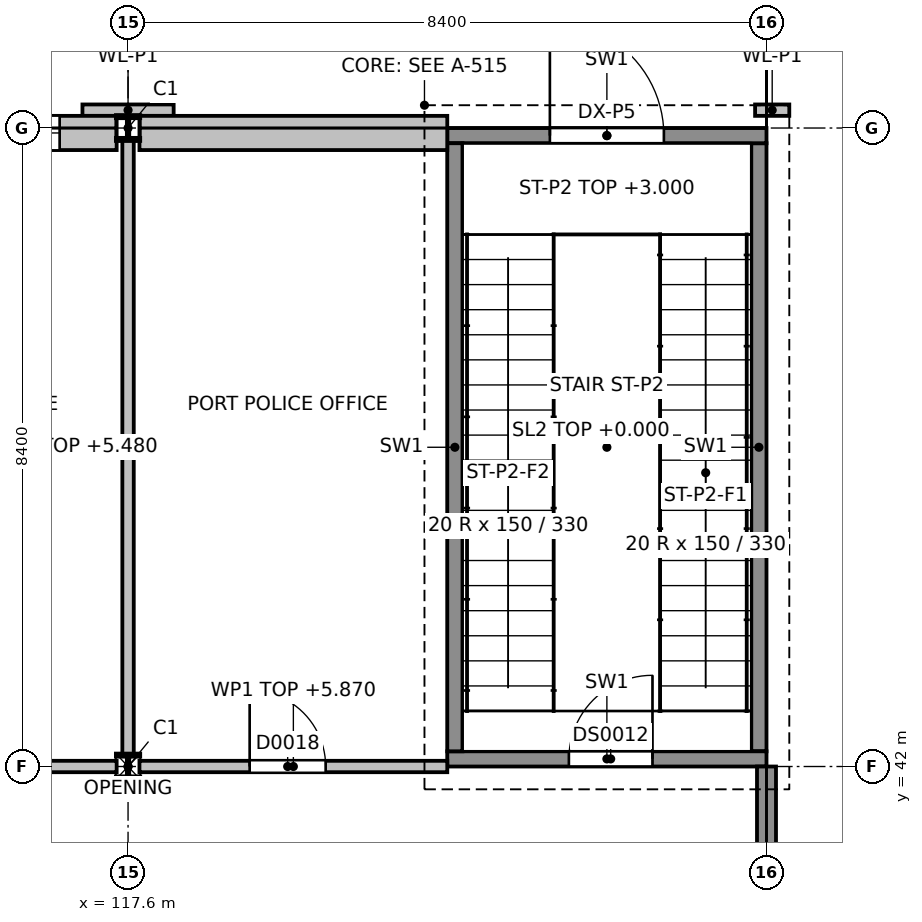
"""IFC4 building model, lengths in metres.
Left out: names, types, materials, properties, quantities, classifications, styles, units other than length and angle.
Written with IfcOpenShell. Run it as: python <this file> out.ifc"""

import sys

from ifc_helpers import new_model, si_unit, direction, frame, frame_2d, origin, origin_2d, place, context, subcontext, project, spatial, rectangle, i_section, extrude, element, fill, save


model = new_model("IFC4")
c1 = context("Model", 3, precision=1e-05, world=origin(), true_north=direction((0.0, 1.0)))
c2 = subcontext(c1, "Body", "Model", "MODEL_VIEW")
j1 = project(units=[si_unit("LENGTHUNIT", "METRE"), si_unit("PLANEANGLEUNIT", "RADIAN")], contexts=[c1])
p1 = place(None, origin())
s1 = spatial("IfcSite", under=j1, at=p1, CompositionType="ELEMENT")
p2 = place(p1, origin())
s2 = spatial("IfcBuilding", under=s1, at=p2, CompositionType="ELEMENT")
p3 = place(p2, origin())
s3 = spatial("IfcBuildingStorey", under=s2, at=p3, CompositionType="ELEMENT", Elevation=0.0)
for number, where, z_axis, x_axis in (
    (1, (117.6, 42.0, -1.35), (0.0, 0.0, 1.0), (1.0, 0.0, 0.0)),
    (2, (117.6, 50.4, -1.35), (0.0, 0.0, 1.0), (1.0, 0.0, 0.0)),
):
    element("IfcColumn", number, at=place(p3, frame(where, z_axis=z_axis, x_axis=x_axis)), inside=s3, PredefinedType="COLUMN", context=c2, shape_type="SweptSolid", body=[
        extrude(i_section(OverallWidth=0.3, OverallDepth=0.32, WebThickness=0.011, FlangeThickness=0.021, at=origin_2d()), origin(), (0.0, 0.0, 1.0), 7.35),
    ])
p4 = place(p3, frame((121.8, 42.1, -1.35), z_axis=(0.0, 0.0, 1.0), x_axis=(1.0, 0.0, 0.0)))
e3 = element("IfcWall", 3, at=p4, inside=s3, PredefinedType="SHEAR", context=c2, shape_type="SweptSolid", body=[
    extrude(rectangle(XDim=4.2, YDim=0.2, at=frame_2d((2.1, 0.0))), origin(), (0.0, 0.0, 1.0), 7.35),
])
p5 = place(p4, frame((1.6, 0.0, 1.35)))
e4 = element("IfcOpeningElement", 4, at=p5, cuts=e3, PredefinedType="OPENING", context=c2, shape_type="SweptSolid", body=[
    extrude(rectangle(XDim=1.1, YDim=2.1, at=frame_2d((0.55, 1.05))), frame((0.0, 0.1, 0.0), z_axis=(0.0, -1.0, 0.0), x_axis=(1.0, 0.0, 0.0)), (0.0, 0.0, 1.0), 0.2),
])
p6 = place(p3, frame((121.8, 50.3, -1.35), z_axis=(0.0, 0.0, 1.0), x_axis=(1.0, 0.0, 0.0)))
e5 = element("IfcWall", 5, at=p6, inside=s3, PredefinedType="SHEAR", context=c2, shape_type="SweptSolid", body=[
    extrude(rectangle(XDim=4.2, YDim=0.2, at=frame_2d((2.1, 0.0))), origin(), (0.0, 0.0, 1.0), 7.35),
])
p7 = place(p6, frame((1.35, 0.0, 1.35)))
e6 = element("IfcOpeningElement", 6, at=p7, cuts=e5, PredefinedType="OPENING", context=c2, shape_type="SweptSolid", body=[
    extrude(rectangle(XDim=1.5, YDim=2.4, at=frame_2d((0.75, 1.2))), frame((0.0, 0.1, 0.0), z_axis=(0.0, -1.0, 0.0), x_axis=(1.0, 0.0, 0.0)), (0.0, 0.0, 1.0), 0.2),
])
for number, where, z_axis, x_axis in (
    (7, (121.9, 42.2, -1.35), (0.0, 0.0, 1.0), (0.0, 1.0, 0.0)),
    (8, (125.9, 42.2, -1.35), (0.0, 0.0, 1.0), (0.0, 1.0, 0.0)),
):
    element("IfcWall", number, at=place(p3, frame(where, z_axis=z_axis, x_axis=x_axis)), inside=s3, PredefinedType="SHEAR", context=c2, shape_type="SweptSolid", body=[
        extrude(rectangle(XDim=8.0, YDim=0.2, at=frame_2d((4.0, 0.0))), origin(), (0.0, 0.0, 1.0), 7.35),
    ])
p8 = place(p3, frame((109.2, 50.335, 0.0), z_axis=(0.0, 0.0, 1.0), x_axis=(1.0, 0.0, 0.0)))
e9 = element("IfcWall", 9, at=p8, inside=s3, PredefinedType="SOLIDWALL", context=c2, shape_type="SweptSolid", body=[
    extrude(rectangle(XDim=8.25, YDim=0.45, at=frame_2d((4.125, 0.0))), origin(), (0.0, 0.0, 1.0), 5.25),
])
p9 = place(p8, frame((0.9, 0.0, 0.9)))
e10 = element("IfcOpeningElement", 10, at=p9, cuts=e9, PredefinedType="OPENING", context=c2, shape_type="SweptSolid", body=[
    extrude(rectangle(XDim=3.0, YDim=3.6, at=frame_2d((1.5, 1.8))), frame((0.0, 0.225, 0.0), z_axis=(0.0, -1.0, 0.0), x_axis=(1.0, 0.0, 0.0)), (0.0, 0.0, 1.0), 0.45),
])
p10 = place(p8, frame((4.5, 0.0, 0.9)))
e11 = element("IfcOpeningElement", 11, at=p10, cuts=e9, PredefinedType="OPENING", context=c2, shape_type="SweptSolid", body=[
    extrude(rectangle(XDim=3.0, YDim=3.6, at=frame_2d((1.5, 1.8))), frame((0.0, 0.225, 0.0), z_axis=(0.0, -1.0, 0.0), x_axis=(1.0, 0.0, 0.0)), (0.0, 0.0, 1.0), 0.45),
])
p11 = place(p3, frame((117.75, 50.335, 0.0), z_axis=(0.0, 0.0, 1.0), x_axis=(1.0, 0.0, 0.0)))
e12 = element("IfcWall", 12, at=p11, inside=s3, PredefinedType="SOLIDWALL", context=c2, shape_type="SweptSolid", body=[
    extrude(rectangle(XDim=4.05, YDim=0.45, at=frame_2d((2.025, 0.0))), origin(), (0.0, 0.0, 1.0), 5.25),
])
p12 = place(p3, frame((117.0, 50.635, 0.0), z_axis=(0.0, 0.0, 1.0), x_axis=(1.0, 0.0, 0.0)))
e13 = element("IfcWall", 13, at=p12, inside=s3, PredefinedType="SOLIDWALL", context=c2, shape_type="SweptSolid", body=[
    extrude(rectangle(XDim=1.2, YDim=0.15, at=frame_2d((0.6, 0.0))), origin(), (0.0, 0.0, 1.0), 6.0),
])
p13 = place(p3, frame((125.85, 50.635, 0.0), z_axis=(0.0, 0.0, 1.0), x_axis=(1.0, 0.0, 0.0)))
e14 = element("IfcWall", 14, at=p13, inside=s3, PredefinedType="SOLIDWALL", context=c2, shape_type="SweptSolid", body=[
    extrude(rectangle(XDim=0.45, YDim=0.15, at=frame_2d((0.225, 0.0))), origin(), (0.0, 0.0, 1.0), 6.0),
])
p14 = place(p3, frame((109.2, 42.0, 0.0), z_axis=(0.0, 0.0, 1.0), x_axis=(1.0, 0.0, 0.0)))
e15 = element("IfcWall", 15, at=p14, inside=s3, PredefinedType="PARTITIONING", context=c2, shape_type="SweptSolid", body=[
    extrude(rectangle(XDim=8.25, YDim=0.15, at=frame_2d((4.125, 0.0))), origin(), (0.0, 0.0, 1.0), 5.48),
])
p15 = place(p14, frame((3.7, 0.0, 0.0)))
e16 = element("IfcOpeningElement", 16, at=p15, cuts=e15, PredefinedType="OPENING", context=c2, shape_type="SweptSolid", body=[
    extrude(rectangle(XDim=0.9, YDim=2.1, at=frame_2d((0.45, 1.05))), frame((0.0, 0.075, 0.0), z_axis=(0.0, -1.0, 0.0), x_axis=(1.0, 0.0, 0.0)), (0.0, 0.0, 1.0), 0.15),
])
p16 = place(p3, frame((117.75, 42.0, 0.0), z_axis=(0.0, 0.0, 1.0), x_axis=(1.0, 0.0, 0.0)))
e17 = element("IfcWall", 17, at=p16, inside=s3, PredefinedType="PARTITIONING", context=c2, shape_type="SweptSolid", body=[
    extrude(rectangle(XDim=4.05, YDim=0.15, at=frame_2d((2.025, 0.0))), origin(), (0.0, 0.0, 1.0), 5.87),
])
p17 = place(p16, frame((1.45, 0.0, 0.0)))
e18 = element("IfcOpeningElement", 18, at=p17, cuts=e17, PredefinedType="OPENING", context=c2, shape_type="SweptSolid", body=[
    extrude(rectangle(XDim=1.0, YDim=2.2, at=frame_2d((0.5, 1.1))), frame((0.0, 0.075, 0.0), z_axis=(0.0, -1.0, 0.0), x_axis=(1.0, 0.0, 0.0)), (0.0, 0.0, 1.0), 0.15),
])
p18 = place(p3, frame((126.0, 33.76, 0.0), z_axis=(0.0, 0.0, 1.0), x_axis=(0.0, 1.0, 0.0)))
e19 = element("IfcWall", 19, at=p18, inside=s3, PredefinedType="PARTITIONING", context=c2, shape_type="SweptSolid", body=[
    extrude(rectangle(XDim=8.24, YDim=0.25, at=frame_2d((4.12, 0.0))), origin(), (0.0, 0.0, 1.0), 5.45),
])
p19 = place(p18, frame((2.79, 0.0, 0.0)))
e20 = element("IfcOpeningElement", 20, at=p19, cuts=e19, PredefinedType="OPENING", context=c2, shape_type="SweptSolid", body=[
    extrude(rectangle(XDim=2.4, YDim=2.4, at=frame_2d((1.2, 1.2))), frame((0.0, 0.125, 0.0), z_axis=(0.0, -1.0, 0.0), x_axis=(1.0, 0.0, 0.0)), (0.0, 0.0, 1.0), 0.25),
])
p20 = place(p3, frame((117.6, 42.16, 0.0), z_axis=(0.0, 0.0, 1.0), x_axis=(0.0, 1.0, 0.0)))
e21 = element("IfcWall", 21, at=p20, inside=s3, PredefinedType="PARTITIONING", context=c2, shape_type="SweptSolid", body=[
    extrude(rectangle(XDim=8.08, YDim=0.15, at=frame_2d((4.04, 0.0))), origin(), (0.0, 0.0, 1.0), 5.48),
])
p21 = place(p10, origin())
e22 = element("IfcWindow", 22, at=p21, inside=s3, PartitioningType="SINGLE_PANEL", PredefinedType="WINDOW", context=c2, shape_type="SweptSolid", body=[
    extrude(rectangle(XDim=3.0, YDim=3.6, at=frame_2d((1.5, 1.8))), frame((0.0, 0.03, 0.0), z_axis=(0.0, -1.0, 0.0), x_axis=(1.0, 0.0, 0.0)), (0.0, 0.0, 1.0), 0.06),
])
fill(e11, e22)
p22 = place(p7, origin())
e23 = element("IfcDoor", 23, at=p22, inside=s3, OperationType="DOUBLE_DOOR_SINGLE_SWING", PredefinedType="DOOR", context=c2, shape_type="SweptSolid", body=[
    extrude(rectangle(XDim=1.5, YDim=2.4, at=frame_2d((0.75, 1.2))), frame((0.0, 0.025, 0.0), z_axis=(0.0, -1.0, 0.0), x_axis=(1.0, 0.0, 0.0)), (0.0, 0.0, 1.0), 0.05),
])
fill(e6, e23)
p23 = place(p17, origin())
e24 = element("IfcDoor", 24, at=p23, inside=s3, OperationType="SINGLE_SWING_LEFT", PredefinedType="DOOR", context=c2, shape_type="SweptSolid", body=[
    extrude(rectangle(XDim=1.0, YDim=2.2, at=frame_2d((0.5, 1.1))), frame((0.0, 0.025, 0.0), z_axis=(0.0, -1.0, 0.0), x_axis=(1.0, 0.0, 0.0)), (0.0, 0.0, 1.0), 0.05),
])
fill(e18, e24)
p24 = place(p5, frame((1.1, 0.05, 0.0), z_axis=(0.0, 0.0, 1.0), x_axis=(-1.0, 0.0, 0.0)))
e25 = element("IfcDoor", 25, at=p24, inside=s3, OperationType="SINGLE_SWING_RIGHT", PredefinedType="DOOR", context=c2, shape_type="SweptSolid", body=[
    extrude(rectangle(XDim=1.1, YDim=2.1, at=frame_2d((0.55, 1.05))), frame((0.0, 0.025, 0.0), z_axis=(0.0, -1.0, 0.0), x_axis=(1.0, 0.0, 0.0)), (0.0, 0.0, 1.0), 0.05),
])
fill(e4, e25)
save(model, sys.argv[1])
